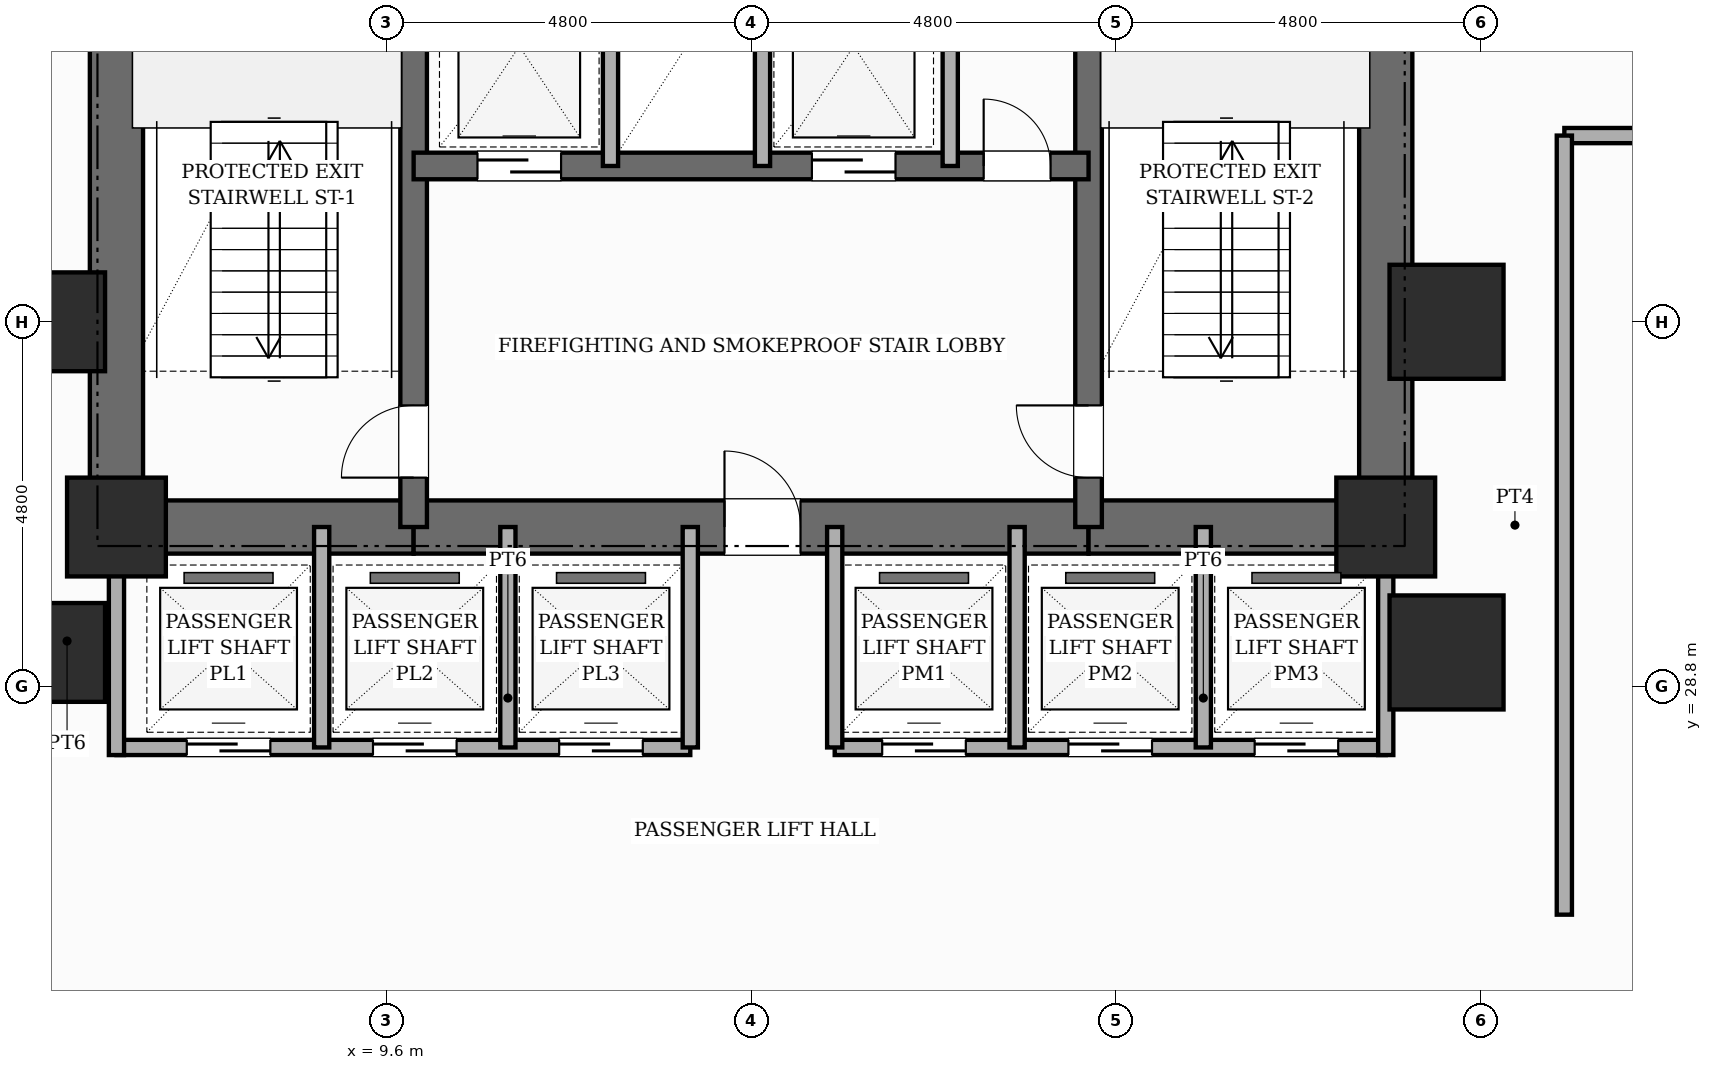
"""IFC4 building model, lengths in metres.
Left out: names, types, materials, properties, quantities, classifications, styles, units other than length and angle.
Written with IfcOpenShell. Run it as: python <this file> out.ifc"""

import sys

from ifc_helpers import new_model, si_unit, direction, frame, frame_2d, origin, origin_2d, place, context, subcontext, project, spatial, rectangle, extrude, element, fill, save


model = new_model("IFC4")
c1 = context("Model", 3, precision=1e-05, world=origin(), true_north=direction((0.0, 1.0)))
c2 = subcontext(c1, "Body", "Model", "MODEL_VIEW")
j1 = project(units=[si_unit("LENGTHUNIT", "METRE"), si_unit("PLANEANGLEUNIT", "RADIAN")], contexts=[c1])
p1 = place(None, origin())
s1 = spatial("IfcSite", under=j1, at=p1, CompositionType="ELEMENT")
p2 = place(p1, origin())
s2 = spatial("IfcBuilding", under=s1, at=p2, CompositionType="ELEMENT")
p3 = place(p2, frame((0.0, 0.0, -8.8)))
s3 = spatial("IfcBuildingStorey", under=s2, at=p3, CompositionType="ELEMENT", Elevation=-8.8)
p4 = place(p3, frame((6.05, 30.55, 0.0), z_axis=(0.0, 0.0, 1.0), x_axis=(0.0, 1.0, 0.0)))
e1 = element("IfcWall", 1, at=p4, inside=s3, PredefinedType="SHEAR", context=c2, shape_type="SweptSolid", body=[
    extrude(rectangle(XDim=15.6, YDim=0.7, at=frame_2d((7.8, 0.0))), origin(), (0.0, 0.0, 1.0), 4.4),
])
p5 = place(p3, frame((22.75, 30.55, 0.0), z_axis=(0.0, 0.0, 1.0), x_axis=(0.0, 1.0, 0.0)))
e2 = element("IfcWall", 2, at=p5, inside=s3, PredefinedType="SHEAR", context=c2, shape_type="SweptSolid", body=[
    extrude(rectangle(XDim=15.6, YDim=0.7, at=frame_2d((7.8, 0.0))), origin(), (0.0, 0.0, 1.0), 4.4),
])
p6 = place(p5, frame((10.8, 0.0, 0.0)))
e3 = element("IfcOpeningElement", 3, at=p6, cuts=e2, PredefinedType="OPENING", context=c2, shape_type="SweptSolid", body=[
    extrude(rectangle(XDim=1.0, YDim=2.15, at=frame_2d((0.5, 1.075))), frame((0.0, 0.36, 0.0), z_axis=(0.0, -1.0, 0.0), x_axis=(1.0, 0.0, 0.0)), (0.0, 0.0, 1.0), 0.72),
])
p7 = place(p3, frame((6.05, 30.9, 0.0), z_axis=(0.0, 0.0, 1.0), x_axis=(1.0, 0.0, 0.0)))
e4 = element("IfcWall", 4, at=p7, inside=s3, PredefinedType="SHEAR", context=c2, shape_type="SweptSolid", body=[
    extrude(rectangle(XDim=3.91, YDim=0.7, at=frame_2d((1.955, 0.0))), origin(), (0.0, 0.0, 1.0), 4.4),
])
p8 = place(p3, frame((9.96, 30.9, 0.0), z_axis=(0.0, 0.0, 1.0), x_axis=(1.0, 0.0, 0.0)))
e5 = element("IfcWall", 5, at=p8, inside=s3, PredefinedType="SHEAR", context=c2, shape_type="SweptSolid", body=[
    extrude(rectangle(XDim=8.88, YDim=0.7, at=frame_2d((4.44, 0.0))), origin(), (0.0, 0.0, 1.0), 4.4),
])
p9 = place(p8, frame((4.09, 0.0, 0.0)))
e6 = element("IfcOpeningElement", 6, at=p9, cuts=e5, PredefinedType="OPENING", context=c2, shape_type="SweptSolid", body=[
    extrude(rectangle(XDim=1.0, YDim=2.15, at=frame_2d((0.5, 1.075))), frame((0.0, 0.36, 0.0), z_axis=(0.0, -1.0, 0.0), x_axis=(1.0, 0.0, 0.0)), (0.0, 0.0, 1.0), 0.72),
])
p10 = place(p3, frame((18.84, 30.9, 0.0), z_axis=(0.0, 0.0, 1.0), x_axis=(1.0, 0.0, 0.0)))
e7 = element("IfcWall", 7, at=p10, inside=s3, PredefinedType="SHEAR", context=c2, shape_type="SweptSolid", body=[
    extrude(rectangle(XDim=3.91, YDim=0.7, at=frame_2d((1.955, 0.0))), origin(), (0.0, 0.0, 1.0), 4.4),
])
p11 = place(p3, frame((9.96, 30.9, 0.0), z_axis=(0.0, 0.0, 1.0), x_axis=(0.0, 1.0, 0.0)))
e8 = element("IfcWall", 8, at=p11, inside=s3, PredefinedType="SHEAR", context=c2, shape_type="SweptSolid", body=[
    extrude(rectangle(XDim=14.9, YDim=0.35, at=frame_2d((7.45, 0.0))), origin(), (0.0, 0.0, 1.0), 4.4),
])
p12 = place(p11, frame((0.65, 0.0, 0.0)))
e9 = element("IfcOpeningElement", 9, at=p12, cuts=e8, PredefinedType="OPENING", context=c2, shape_type="SweptSolid", body=[
    extrude(rectangle(XDim=0.95, YDim=2.1, at=frame_2d((0.475, 1.05))), frame((0.0, 0.185, 0.0), z_axis=(0.0, -1.0, 0.0), x_axis=(1.0, 0.0, 0.0)), (0.0, 0.0, 1.0), 0.37),
])
p13 = place(p11, frame((10.45, 0.0, 0.0)))
e10 = element("IfcOpeningElement", 10, at=p13, cuts=e8, PredefinedType="OPENING", context=c2, shape_type="SweptSolid", body=[
    extrude(rectangle(XDim=1.0, YDim=2.15, at=frame_2d((0.5, 1.075))), frame((0.0, 0.185, 0.0), z_axis=(0.0, -1.0, 0.0), x_axis=(1.0, 0.0, 0.0)), (0.0, 0.0, 1.0), 0.37),
])
p14 = place(p3, frame((18.84, 30.9, 0.0), z_axis=(0.0, 0.0, 1.0), x_axis=(0.0, 1.0, 0.0)))
e11 = element("IfcWall", 11, at=p14, inside=s3, PredefinedType="SHEAR", context=c2, shape_type="SweptSolid", body=[
    extrude(rectangle(XDim=14.9, YDim=0.35, at=frame_2d((7.45, 0.0))), origin(), (0.0, 0.0, 1.0), 4.4),
])
p15 = place(p14, frame((0.65, 0.0, 0.0)))
e12 = element("IfcOpeningElement", 12, at=p15, cuts=e11, PredefinedType="OPENING", context=c2, shape_type="SweptSolid", body=[
    extrude(rectangle(XDim=0.95, YDim=2.1, at=frame_2d((0.475, 1.05))), frame((0.0, 0.185, 0.0), z_axis=(0.0, -1.0, 0.0), x_axis=(1.0, 0.0, 0.0)), (0.0, 0.0, 1.0), 0.37),
])
p16 = place(p14, frame((10.45, 0.0, 0.0)))
e13 = element("IfcOpeningElement", 13, at=p16, cuts=e11, PredefinedType="OPENING", context=c2, shape_type="SweptSolid", body=[
    extrude(rectangle(XDim=1.0, YDim=2.15, at=frame_2d((0.5, 1.075))), frame((0.0, 0.185, 0.0), z_axis=(0.0, -1.0, 0.0), x_axis=(1.0, 0.0, 0.0)), (0.0, 0.0, 1.0), 0.37),
])
p17 = place(p3, frame((9.96, 35.65, 0.0), z_axis=(0.0, 0.0, 1.0), x_axis=(1.0, 0.0, 0.0)))
e14 = element("IfcWall", 14, at=p17, inside=s3, PredefinedType="SHEAR", context=c2, shape_type="SweptSolid", body=[
    extrude(rectangle(XDim=8.88, YDim=0.35, at=frame_2d((4.44, 0.0))), origin(), (0.0, 0.0, 1.0), 4.4),
])
p18 = place(p17, frame((0.84, 0.0, 0.0)))
e15 = element("IfcOpeningElement", 15, at=p18, cuts=e14, PredefinedType="OPENING", context=c2, shape_type="SweptSolid", body=[
    extrude(rectangle(XDim=1.1, YDim=2.15, at=frame_2d((0.55, 1.075))), frame((0.0, 0.185, 0.0), z_axis=(0.0, -1.0, 0.0), x_axis=(1.0, 0.0, 0.0)), (0.0, 0.0, 1.0), 0.37),
])
p19 = place(p17, frame((5.24, 0.0, 0.0)))
e16 = element("IfcOpeningElement", 16, at=p19, cuts=e14, PredefinedType="OPENING", context=c2, shape_type="SweptSolid", body=[
    extrude(rectangle(XDim=1.1, YDim=2.15, at=frame_2d((0.55, 1.075))), frame((0.0, 0.185, 0.0), z_axis=(0.0, -1.0, 0.0), x_axis=(1.0, 0.0, 0.0)), (0.0, 0.0, 1.0), 0.37),
])
p20 = place(p17, frame((7.5, 0.0, 0.0)))
e17 = element("IfcOpeningElement", 17, at=p20, cuts=e14, PredefinedType="OPENING", context=c2, shape_type="SweptSolid", body=[
    extrude(rectangle(XDim=0.88, YDim=2.1, at=frame_2d((0.44, 1.05))), frame((0.0, 0.185, 0.0), z_axis=(0.0, -1.0, 0.0), x_axis=(1.0, 0.0, 0.0)), (0.0, 0.0, 1.0), 0.37),
])
for number, where, z_axis, x_axis in (
    (18, (5.25, 29.25, 0.0), (0.0, 0.0, 1.0), (1.0, 0.0, 0.0)),
    (19, (5.25, 33.6, 0.0), (0.0, 0.0, 1.0), (1.0, 0.0, 0.0)),
    (20, (6.05, 30.9, 0.0), (0.0, 0.0, 1.0), (1.0, 0.0, 0.0)),
    (21, (22.75, 30.9, 0.0), (0.0, 0.0, 1.0), (1.0, 0.0, 0.0)),
):
    element("IfcColumn", number, at=place(p3, frame(where, z_axis=z_axis, x_axis=x_axis)), inside=s3, PredefinedType="COLUMN", context=c2, shape_type="SweptSolid", body=[
        extrude(rectangle(XDim=1.3, YDim=1.3, at=origin_2d()), origin(), (0.0, 0.0, 1.0), 4.4),
    ])
for number, where, z_axis, x_axis in (
    (22, (23.55, 29.25, 0.0), (0.0, 0.0, 1.0), (1.0, 0.0, 0.0)),
    (23, (23.55, 33.6, 0.0), (0.0, 0.0, 1.0), (1.0, 0.0, 0.0)),
):
    element("IfcColumn", number, at=place(p3, frame(where, z_axis=z_axis, x_axis=x_axis)), inside=s3, PredefinedType="USERDEFINED", context=c2, shape_type="SweptSolid", body=[
        extrude(rectangle(XDim=1.5, YDim=1.5, at=origin_2d()), origin(), (0.0, 0.0, 1.0), 4.4),
    ])
for number, where, z_axis, x_axis in (
    (24, (12.55, 35.65, 0.0), (0.0, 0.0, 1.0), (0.0, 1.0, 0.0)),
    (25, (14.55, 35.65, 0.0), (0.0, 0.0, 1.0), (0.0, 1.0, 0.0)),
):
    element("IfcWall", number, at=place(p3, frame(where, z_axis=z_axis, x_axis=x_axis)), inside=s3, PredefinedType="POLYGONAL", context=c2, shape_type="SweptSolid", body=[
        extrude(rectangle(XDim=3.07, YDim=0.2, at=frame_2d((1.535, 0.0))), origin(), (0.0, 0.0, 1.0), 4.08),
    ])
p21 = place(p3, frame((17.02, 35.65, 0.0), z_axis=(0.0, 0.0, 1.0), x_axis=(0.0, 1.0, 0.0)))
e26 = element("IfcWall", 26, at=p21, inside=s3, PredefinedType="POLYGONAL", context=c2, shape_type="SweptSolid", body=[
    extrude(rectangle(XDim=5.15, YDim=0.2, at=frame_2d((2.575, 0.0))), origin(), (0.0, 0.0, 1.0), 4.08),
])
p22 = place(p3, frame((6.05, 28.0, 0.0), z_axis=(0.0, 0.0, 1.0), x_axis=(1.0, 0.0, 0.0)))
e27 = element("IfcWall", 27, at=p22, inside=s3, PredefinedType="POLYGONAL", context=c2, shape_type="SweptSolid", body=[
    extrude(rectangle(XDim=7.55, YDim=0.2, at=frame_2d((3.775, 0.0))), origin(), (0.0, 0.0, 1.0), 4.08),
])
p23 = place(p22, frame((0.925, 0.0, 0.0)))
e28 = element("IfcOpeningElement", 28, at=p23, cuts=e27, PredefinedType="OPENING", context=c2, shape_type="SweptSolid", body=[
    extrude(rectangle(XDim=1.1, YDim=2.15, at=frame_2d((0.55, 1.075))), frame((0.0, 0.11, 0.0), z_axis=(0.0, -1.0, 0.0), x_axis=(1.0, 0.0, 0.0)), (0.0, 0.0, 1.0), 0.22),
])
p24 = place(p22, frame((3.375, 0.0, 0.0)))
e29 = element("IfcOpeningElement", 29, at=p24, cuts=e27, PredefinedType="OPENING", context=c2, shape_type="SweptSolid", body=[
    extrude(rectangle(XDim=1.1, YDim=2.15, at=frame_2d((0.55, 1.075))), frame((0.0, 0.11, 0.0), z_axis=(0.0, -1.0, 0.0), x_axis=(1.0, 0.0, 0.0)), (0.0, 0.0, 1.0), 0.22),
])
p25 = place(p22, frame((5.825, 0.0, 0.0)))
e30 = element("IfcOpeningElement", 30, at=p25, cuts=e27, PredefinedType="OPENING", context=c2, shape_type="SweptSolid", body=[
    extrude(rectangle(XDim=1.1, YDim=2.15, at=frame_2d((0.55, 1.075))), frame((0.0, 0.11, 0.0), z_axis=(0.0, -1.0, 0.0), x_axis=(1.0, 0.0, 0.0)), (0.0, 0.0, 1.0), 0.22),
])
p26 = place(p3, frame((15.5, 28.0, 0.0), z_axis=(0.0, 0.0, 1.0), x_axis=(1.0, 0.0, 0.0)))
e31 = element("IfcWall", 31, at=p26, inside=s3, PredefinedType="POLYGONAL", context=c2, shape_type="SweptSolid", body=[
    extrude(rectangle(XDim=7.25, YDim=0.2, at=frame_2d((3.625, 0.0))), origin(), (0.0, 0.0, 1.0), 4.08),
])
p27 = place(p26, frame((0.625, 0.0, 0.0)))
e32 = element("IfcOpeningElement", 32, at=p27, cuts=e31, PredefinedType="OPENING", context=c2, shape_type="SweptSolid", body=[
    extrude(rectangle(XDim=1.1, YDim=2.15, at=frame_2d((0.55, 1.075))), frame((0.0, 0.11, 0.0), z_axis=(0.0, -1.0, 0.0), x_axis=(1.0, 0.0, 0.0)), (0.0, 0.0, 1.0), 0.22),
])
p28 = place(p26, frame((3.075, 0.0, 0.0)))
e33 = element("IfcOpeningElement", 33, at=p28, cuts=e31, PredefinedType="OPENING", context=c2, shape_type="SweptSolid", body=[
    extrude(rectangle(XDim=1.1, YDim=2.15, at=frame_2d((0.55, 1.075))), frame((0.0, 0.11, 0.0), z_axis=(0.0, -1.0, 0.0), x_axis=(1.0, 0.0, 0.0)), (0.0, 0.0, 1.0), 0.22),
])
p29 = place(p26, frame((5.525, 0.0, 0.0)))
e34 = element("IfcOpeningElement", 34, at=p29, cuts=e31, PredefinedType="OPENING", context=c2, shape_type="SweptSolid", body=[
    extrude(rectangle(XDim=1.1, YDim=2.15, at=frame_2d((0.55, 1.075))), frame((0.0, 0.11, 0.0), z_axis=(0.0, -1.0, 0.0), x_axis=(1.0, 0.0, 0.0)), (0.0, 0.0, 1.0), 0.22),
])
for number, where, z_axis, x_axis in (
    (35, (6.05, 27.9, 0.0), (0.0, 0.0, 1.0), (0.0, 1.0, 0.0)),
    (36, (22.75, 27.9, 0.0), (0.0, 0.0, 1.0), (0.0, 1.0, 0.0)),
):
    element("IfcWall", number, at=place(p3, frame(where, z_axis=z_axis, x_axis=x_axis)), inside=s3, PredefinedType="POLYGONAL", context=c2, shape_type="SweptSolid", body=[
        extrude(rectangle(XDim=3.0, YDim=0.2, at=frame_2d((1.5, 0.0))), origin(), (0.0, 0.0, 1.0), 4.08),
    ])
for number, where, z_axis, x_axis in (
    (37, (13.6, 28.0, 0.0), (0.0, 0.0, 1.0), (0.0, 1.0, 0.0)),
    (38, (15.5, 28.0, 0.0), (0.0, 0.0, 1.0), (0.0, 1.0, 0.0)),
    (39, (8.75, 28.0, 0.0), (0.0, 0.0, 1.0), (0.0, 1.0, 0.0)),
    (40, (11.2, 28.0, 0.0), (0.0, 0.0, 1.0), (0.0, 1.0, 0.0)),
    (41, (17.9, 28.0, 0.0), (0.0, 0.0, 1.0), (0.0, 1.0, 0.0)),
    (42, (20.35, 28.0, 0.0), (0.0, 0.0, 1.0), (0.0, 1.0, 0.0)),
):
    element("IfcWall", number, at=place(p3, frame(where, z_axis=z_axis, x_axis=x_axis)), inside=s3, PredefinedType="POLYGONAL", context=c2, shape_type="SweptSolid", body=[
        extrude(rectangle(XDim=2.9, YDim=0.2, at=frame_2d((1.45, 0.0))), origin(), (0.0, 0.0, 1.0), 4.08),
    ])
p30 = place(p3, frame((25.1, 36.05, 0.0), z_axis=(0.0, 0.0, 1.0), x_axis=(1.0, 0.0, 0.0)))
e43 = element("IfcWall", 43, at=p30, inside=s3, PredefinedType="PARTITIONING", context=c2, shape_type="SweptSolid", body=[
    extrude(rectangle(XDim=18.92, YDim=0.2, at=frame_2d((9.46, 0.0))), origin(), (0.0, 0.0, 1.0), 4.08),
])
p31 = place(p30, frame((4.2, 0.0, 0.0)))
e44 = element("IfcOpeningElement", 44, at=p31, cuts=e43, PredefinedType="OPENING", context=c2, shape_type="SweptSolid", body=[
    extrude(rectangle(XDim=1.0, YDim=2.15, at=frame_2d((0.5, 1.075))), frame((0.0, 0.11, 0.0), z_axis=(0.0, -1.0, 0.0), x_axis=(1.0, 0.0, 0.0)), (0.0, 0.0, 1.0), 0.22),
])
p32 = place(p3, frame((25.1, 25.8, 0.0), z_axis=(0.0, 0.0, 1.0), x_axis=(0.0, 1.0, 0.0)))
e45 = element("IfcWall", 45, at=p32, inside=s3, PredefinedType="PARTITIONING", context=c2, shape_type="SweptSolid", body=[
    extrude(rectangle(XDim=10.25, YDim=0.2, at=frame_2d((5.125, 0.0))), origin(), (0.0, 0.0, 1.0), 4.08),
])
p33 = place(p12, origin())
e46 = element("IfcDoor", 46, at=p33, inside=s3, OperationType="SINGLE_SWING_LEFT", PredefinedType="DOOR", context=c2, shape_type="SweptSolid", body=[
    extrude(rectangle(XDim=0.95, YDim=2.1, at=frame_2d((0.475, 1.05))), frame((0.0, 0.025, 0.0), z_axis=(0.0, -1.0, 0.0), x_axis=(1.0, 0.0, 0.0)), (0.0, 0.0, 1.0), 0.05),
])
fill(e9, e46)
p34 = place(p15, origin())
e47 = element("IfcDoor", 47, at=p34, inside=s3, OperationType="SINGLE_SWING_RIGHT", PredefinedType="DOOR", context=c2, shape_type="SweptSolid", body=[
    extrude(rectangle(XDim=0.95, YDim=2.1, at=frame_2d((0.475, 1.05))), frame((0.0, 0.025, 0.0), z_axis=(0.0, -1.0, 0.0), x_axis=(1.0, 0.0, 0.0)), (0.0, 0.0, 1.0), 0.05),
])
fill(e12, e47)
p35 = place(p9, origin())
e48 = element("IfcDoor", 48, at=p35, inside=s3, OperationType="SINGLE_SWING_LEFT", PredefinedType="DOOR", context=c2, shape_type="SweptSolid", body=[
    extrude(rectangle(XDim=1.0, YDim=2.15, at=frame_2d((0.5, 1.075))), frame((0.0, 0.025, 0.0), z_axis=(0.0, -1.0, 0.0), x_axis=(1.0, 0.0, 0.0)), (0.0, 0.0, 1.0), 0.05),
])
fill(e6, e48)
p36 = place(p18, origin())
e49 = element("IfcDoor", 49, at=p36, inside=s3, OperationType="SLIDING_TO_LEFT", PredefinedType="DOOR", context=c2, shape_type="SweptSolid", body=[
    extrude(rectangle(XDim=1.1, YDim=2.15, at=frame_2d((0.55, 1.075))), frame((0.0, 0.025, 0.0), z_axis=(0.0, -1.0, 0.0), x_axis=(1.0, 0.0, 0.0)), (0.0, 0.0, 1.0), 0.05),
])
fill(e15, e49)
p37 = place(p19, origin())
e50 = element("IfcDoor", 50, at=p37, inside=s3, OperationType="SLIDING_TO_RIGHT", PredefinedType="DOOR", context=c2, shape_type="SweptSolid", body=[
    extrude(rectangle(XDim=1.1, YDim=2.15, at=frame_2d((0.55, 1.075))), frame((0.0, 0.025, 0.0), z_axis=(0.0, -1.0, 0.0), x_axis=(1.0, 0.0, 0.0)), (0.0, 0.0, 1.0), 0.05),
])
fill(e16, e50)
p38 = place(p20, origin())
e51 = element("IfcDoor", 51, at=p38, inside=s3, OperationType="SINGLE_SWING_LEFT", PredefinedType="DOOR", context=c2, shape_type="SweptSolid", body=[
    extrude(rectangle(XDim=0.88, YDim=2.1, at=frame_2d((0.44, 1.05))), frame((0.0, 0.025, 0.0), z_axis=(0.0, -1.0, 0.0), x_axis=(1.0, 0.0, 0.0)), (0.0, 0.0, 1.0), 0.05),
])
fill(e17, e51)
p39 = place(p23, origin())
e52 = element("IfcDoor", 52, at=p39, inside=s3, OperationType="SLIDING_TO_LEFT", PredefinedType="DOOR", context=c2, shape_type="SweptSolid", body=[
    extrude(rectangle(XDim=1.1, YDim=2.15, at=frame_2d((0.55, 1.075))), frame((0.0, 0.025, 0.0), z_axis=(0.0, -1.0, 0.0), x_axis=(1.0, 0.0, 0.0)), (0.0, 0.0, 1.0), 0.05),
])
fill(e28, e52)
p40 = place(p24, origin())
e53 = element("IfcDoor", 53, at=p40, inside=s3, OperationType="SLIDING_TO_RIGHT", PredefinedType="DOOR", context=c2, shape_type="SweptSolid", body=[
    extrude(rectangle(XDim=1.1, YDim=2.15, at=frame_2d((0.55, 1.075))), frame((0.0, 0.025, 0.0), z_axis=(0.0, -1.0, 0.0), x_axis=(1.0, 0.0, 0.0)), (0.0, 0.0, 1.0), 0.05),
])
fill(e29, e53)
p41 = place(p25, origin())
e54 = element("IfcDoor", 54, at=p41, inside=s3, OperationType="SLIDING_TO_LEFT", PredefinedType="DOOR", context=c2, shape_type="SweptSolid", body=[
    extrude(rectangle(XDim=1.1, YDim=2.15, at=frame_2d((0.55, 1.075))), frame((0.0, 0.025, 0.0), z_axis=(0.0, -1.0, 0.0), x_axis=(1.0, 0.0, 0.0)), (0.0, 0.0, 1.0), 0.05),
])
fill(e30, e54)
p42 = place(p27, origin())
e55 = element("IfcDoor", 55, at=p42, inside=s3, OperationType="SLIDING_TO_RIGHT", PredefinedType="DOOR", context=c2, shape_type="SweptSolid", body=[
    extrude(rectangle(XDim=1.1, YDim=2.15, at=frame_2d((0.55, 1.075))), frame((0.0, 0.025, 0.0), z_axis=(0.0, -1.0, 0.0), x_axis=(1.0, 0.0, 0.0)), (0.0, 0.0, 1.0), 0.05),
])
fill(e32, e55)
p43 = place(p28, origin())
e56 = element("IfcDoor", 56, at=p43, inside=s3, OperationType="SLIDING_TO_LEFT", PredefinedType="DOOR", context=c2, shape_type="SweptSolid", body=[
    extrude(rectangle(XDim=1.1, YDim=2.15, at=frame_2d((0.55, 1.075))), frame((0.0, 0.025, 0.0), z_axis=(0.0, -1.0, 0.0), x_axis=(1.0, 0.0, 0.0)), (0.0, 0.0, 1.0), 0.05),
])
fill(e33, e56)
p44 = place(p29, origin())
e57 = element("IfcDoor", 57, at=p44, inside=s3, OperationType="SLIDING_TO_RIGHT", PredefinedType="DOOR", context=c2, shape_type="SweptSolid", body=[
    extrude(rectangle(XDim=1.1, YDim=2.15, at=frame_2d((0.55, 1.075))), frame((0.0, 0.025, 0.0), z_axis=(0.0, -1.0, 0.0), x_axis=(1.0, 0.0, 0.0)), (0.0, 0.0, 1.0), 0.05),
])
fill(e34, e57)
save(model, sys.argv[1])
